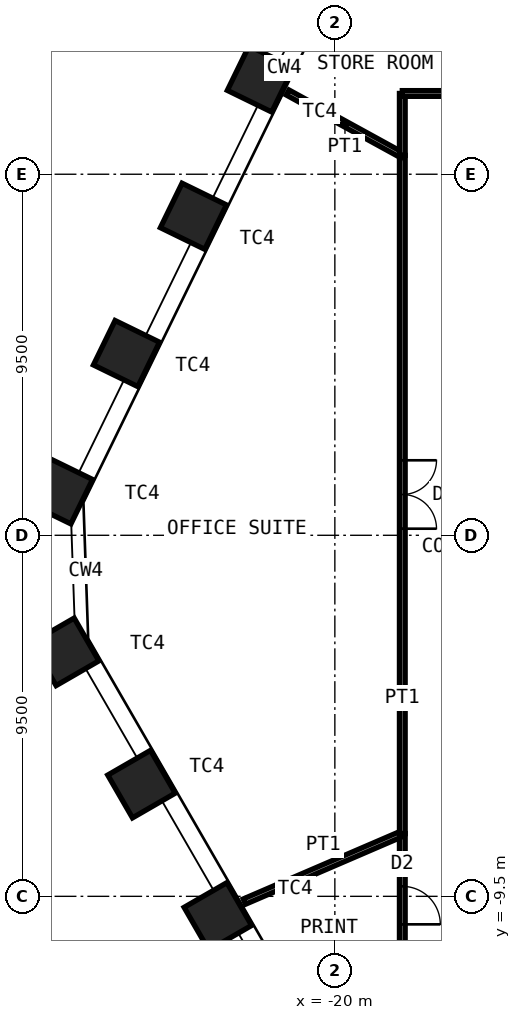
"""IFC4 building model, lengths in metres.
Left out: names, types, materials, properties, quantities, classifications, styles, units other than length and angle.
Written with IfcOpenShell. Run it as: python <this file> out.ifc"""

import sys

from ifc_helpers import new_model, si_unit, direction, frame, frame_2d, origin, origin_2d, place, context, subcontext, project, spatial, rectangle, hollow_rectangle, extrude, element, fill, save


model = new_model("IFC4")
c1 = context("Model", 3, precision=1e-05, world=origin(), true_north=direction((0.0, 1.0)))
c2 = subcontext(c1, "Body", "Model", "MODEL_VIEW")
j1 = project(units=[si_unit("LENGTHUNIT", "METRE"), si_unit("PLANEANGLEUNIT", "RADIAN")], contexts=[c1])
p1 = place(None, origin())
s1 = spatial("IfcSite", under=j1, at=p1, CompositionType="ELEMENT")
p2 = place(p1, origin())
s2 = spatial("IfcBuilding", under=s1, at=p2, CompositionType="ELEMENT")
p3 = place(p2, frame((0.0, 0.0, 161.8)))
s3 = spatial("IfcBuildingStorey", under=s2, at=p3, CompositionType="ELEMENT", Elevation=161.8)
for number, where, z_axis, x_axis in (
    (1, (-23.078, -10.028, 0.0), (0.0, 0.0, 1.0), (0.5, -0.866, 0.0)),
    (2, (-25.087, -6.547, 0.0), (0.0, 0.0, 1.0), (0.5, -0.866, 0.0)),
    (3, (-27.097, -3.067, 0.0), (0.0, 0.0, 1.0), (0.5, -0.866, 0.0)),
    (4, (-27.245, 1.169, 0.0), (0.0, 0.0, 1.0), (-0.438, -0.899, 0.0)),
    (5, (-25.483, 4.781, 0.0), (0.0, 0.0, 1.0), (-0.438, -0.899, 0.0)),
    (6, (-23.721, 8.394, 0.0), (0.0, 0.0, 1.0), (-0.438, -0.899, 0.0)),
    (7, (-21.959, 12.006, 0.0), (0.0, 0.0, 1.0), (-0.438, -0.899, 0.0)),
):
    element("IfcColumn", number, at=place(p3, frame(where, z_axis=z_axis, x_axis=x_axis)), inside=s3, PredefinedType="COLUMN", context=c2, shape_type="SweptSolid", body=[
        extrude(hollow_rectangle(XDim=1.3, YDim=1.3, WallThickness=0.1, at=origin_2d()), origin(), (0.0, 0.0, 1.0), 4.2),
    ])
p4 = place(p3, frame((-18.225, -11.625, 0.0), z_axis=(0.0, 0.0, 1.0), x_axis=(0.0, 1.0, 0.0)))
e8 = element("IfcWall", 8, at=p4, inside=s3, PredefinedType="PARTITIONING", context=c2, shape_type="SweptSolid", body=[
    extrude(rectangle(XDim=3.776, YDim=0.15, at=frame_2d((1.888, 0.0))), origin(), (0.0, 0.0, 1.0), 4.03),
])
p5 = place(p4, frame((1.388, 0.0, 0.0)))
e9 = element("IfcOpeningElement", 9, at=p5, cuts=e8, PredefinedType="OPENING", context=c2, shape_type="SweptSolid", body=[
    extrude(rectangle(XDim=1.0, YDim=2.4, at=frame_2d((0.5, 1.2))), frame((0.0, 0.085, 0.0), z_axis=(0.0, -1.0, 0.0), x_axis=(1.0, 0.0, 0.0)), (0.0, 0.0, 1.0), 0.17),
])
p6 = place(p3, frame((-22.38, -9.638, 0.0), z_axis=(0.0, 0.0, 1.0), x_axis=(0.918428905659, 0.395586078181, 0.0)))
e10 = element("IfcWall", 10, at=p6, inside=s3, PredefinedType="PARTITIONING", context=c2, shape_type="SweptSolid", body=[
    extrude(rectangle(XDim=4.524, YDim=0.15, at=frame_2d((2.262, 0.0))), origin(), (0.0, 0.0, 1.0), 3.28),
])
p7 = place(p3, frame((-18.225, -7.849, 0.0), z_axis=(0.0, 0.0, 1.0), x_axis=(0.0, 1.0, 0.0)))
e11 = element("IfcWall", 11, at=p7, inside=s3, PredefinedType="PARTITIONING", context=c2, shape_type="SweptSolid", body=[
    extrude(rectangle(XDim=17.845, YDim=0.15, at=frame_2d((8.922, 0.0))), origin(), (0.0, 0.0, 1.0), 4.03),
])
p8 = place(p7, frame((8.022, 0.0, 0.0)))
e12 = element("IfcOpeningElement", 12, at=p8, cuts=e11, PredefinedType="OPENING", context=c2, shape_type="SweptSolid", body=[
    extrude(rectangle(XDim=1.8, YDim=2.4, at=frame_2d((0.9, 1.2))), frame((0.0, 0.085, 0.0), z_axis=(0.0, -1.0, 0.0), x_axis=(1.0, 0.0, 0.0)), (0.0, 0.0, 1.0), 0.17),
])
p9 = place(p3, frame((-21.242, 11.651, 0.0), z_axis=(0.0, 0.0, 1.0), x_axis=(0.876768023831, -0.480913539409, 0.0)))
e13 = element("IfcWall", 13, at=p9, inside=s3, PredefinedType="PARTITIONING", context=c2, shape_type="SweptSolid", body=[
    extrude(rectangle(XDim=3.441, YDim=0.15, at=frame_2d((1.721, 0.0))), origin(), (0.0, 0.0, 1.0), 3.28),
])
p10 = place(p3, frame((-18.225, 9.996, 0.0), z_axis=(0.0, 0.0, 1.0), x_axis=(0.0, 1.0, 0.0)))
e14 = element("IfcWall", 14, at=p10, inside=s3, PredefinedType="PARTITIONING", context=c2, shape_type="SweptSolid", body=[
    extrude(rectangle(XDim=1.629, YDim=0.15, at=frame_2d((0.814, 0.0))), origin(), (0.0, 0.0, 1.0), 4.03),
])
p11 = place(p3, frame((-18.225, 11.625, 0.0), z_axis=(0.0, 0.0, 1.0), x_axis=(1.0, 0.0, 0.0)))
e15 = element("IfcWall", 15, at=p11, inside=s3, PredefinedType="PARTITIONING", context=c2, shape_type="SweptSolid", body=[
    extrude(rectangle(XDim=3.368, YDim=0.15, at=frame_2d((1.684, 0.0))), origin(), (0.0, 0.0, 1.0), 4.03),
])
p12 = place(p11, frame((1.184, 0.0, 0.0)))
e16 = element("IfcOpeningElement", 16, at=p12, cuts=e15, PredefinedType="OPENING", context=c2, shape_type="SweptSolid", body=[
    extrude(rectangle(XDim=1.0, YDim=2.4, at=frame_2d((0.5, 1.2))), frame((0.0, 0.085, 0.0), z_axis=(0.0, -1.0, 0.0), x_axis=(1.0, 0.0, 0.0)), (0.0, 0.0, 1.0), 0.17),
])
p13 = place(p3, frame((-19.49, 15.25, 0.0), z_axis=(0.0, 0.0, 1.0), x_axis=(0.787549668605, -0.616251182133, 0.0)))
e17 = element("IfcWall", 17, at=p13, inside=s3, PredefinedType="PARTITIONING", context=c2, shape_type="SweptSolid", body=[
    extrude(rectangle(XDim=5.882, YDim=0.15, at=frame_2d((2.941, 0.0))), origin(), (0.0, 0.0, 1.0), 3.28),
])
p14 = place(p5, origin())
e18 = element("IfcDoor", 18, at=p14, inside=s3, OperationType="SINGLE_SWING_LEFT", PredefinedType="DOOR", context=c2, shape_type="SweptSolid", body=[
    extrude(rectangle(XDim=1.0, YDim=2.4, at=frame_2d((0.5, 1.2))), frame((0.0, 0.025, 0.0), z_axis=(0.0, -1.0, 0.0), x_axis=(1.0, 0.0, 0.0)), (0.0, 0.0, 1.0), 0.05),
])
fill(e9, e18)
p15 = place(p8, origin())
e19 = element("IfcDoor", 19, at=p15, inside=s3, OperationType="DOUBLE_DOOR_DOUBLE_SWING", PredefinedType="DOOR", context=c2, shape_type="SweptSolid", body=[
    extrude(rectangle(XDim=1.8, YDim=2.4, at=frame_2d((0.9, 1.2))), frame((0.0, 0.025, 0.0), z_axis=(0.0, -1.0, 0.0), x_axis=(1.0, 0.0, 0.0)), (0.0, 0.0, 1.0), 0.05),
])
fill(e12, e19)
save(model, sys.argv[1])
